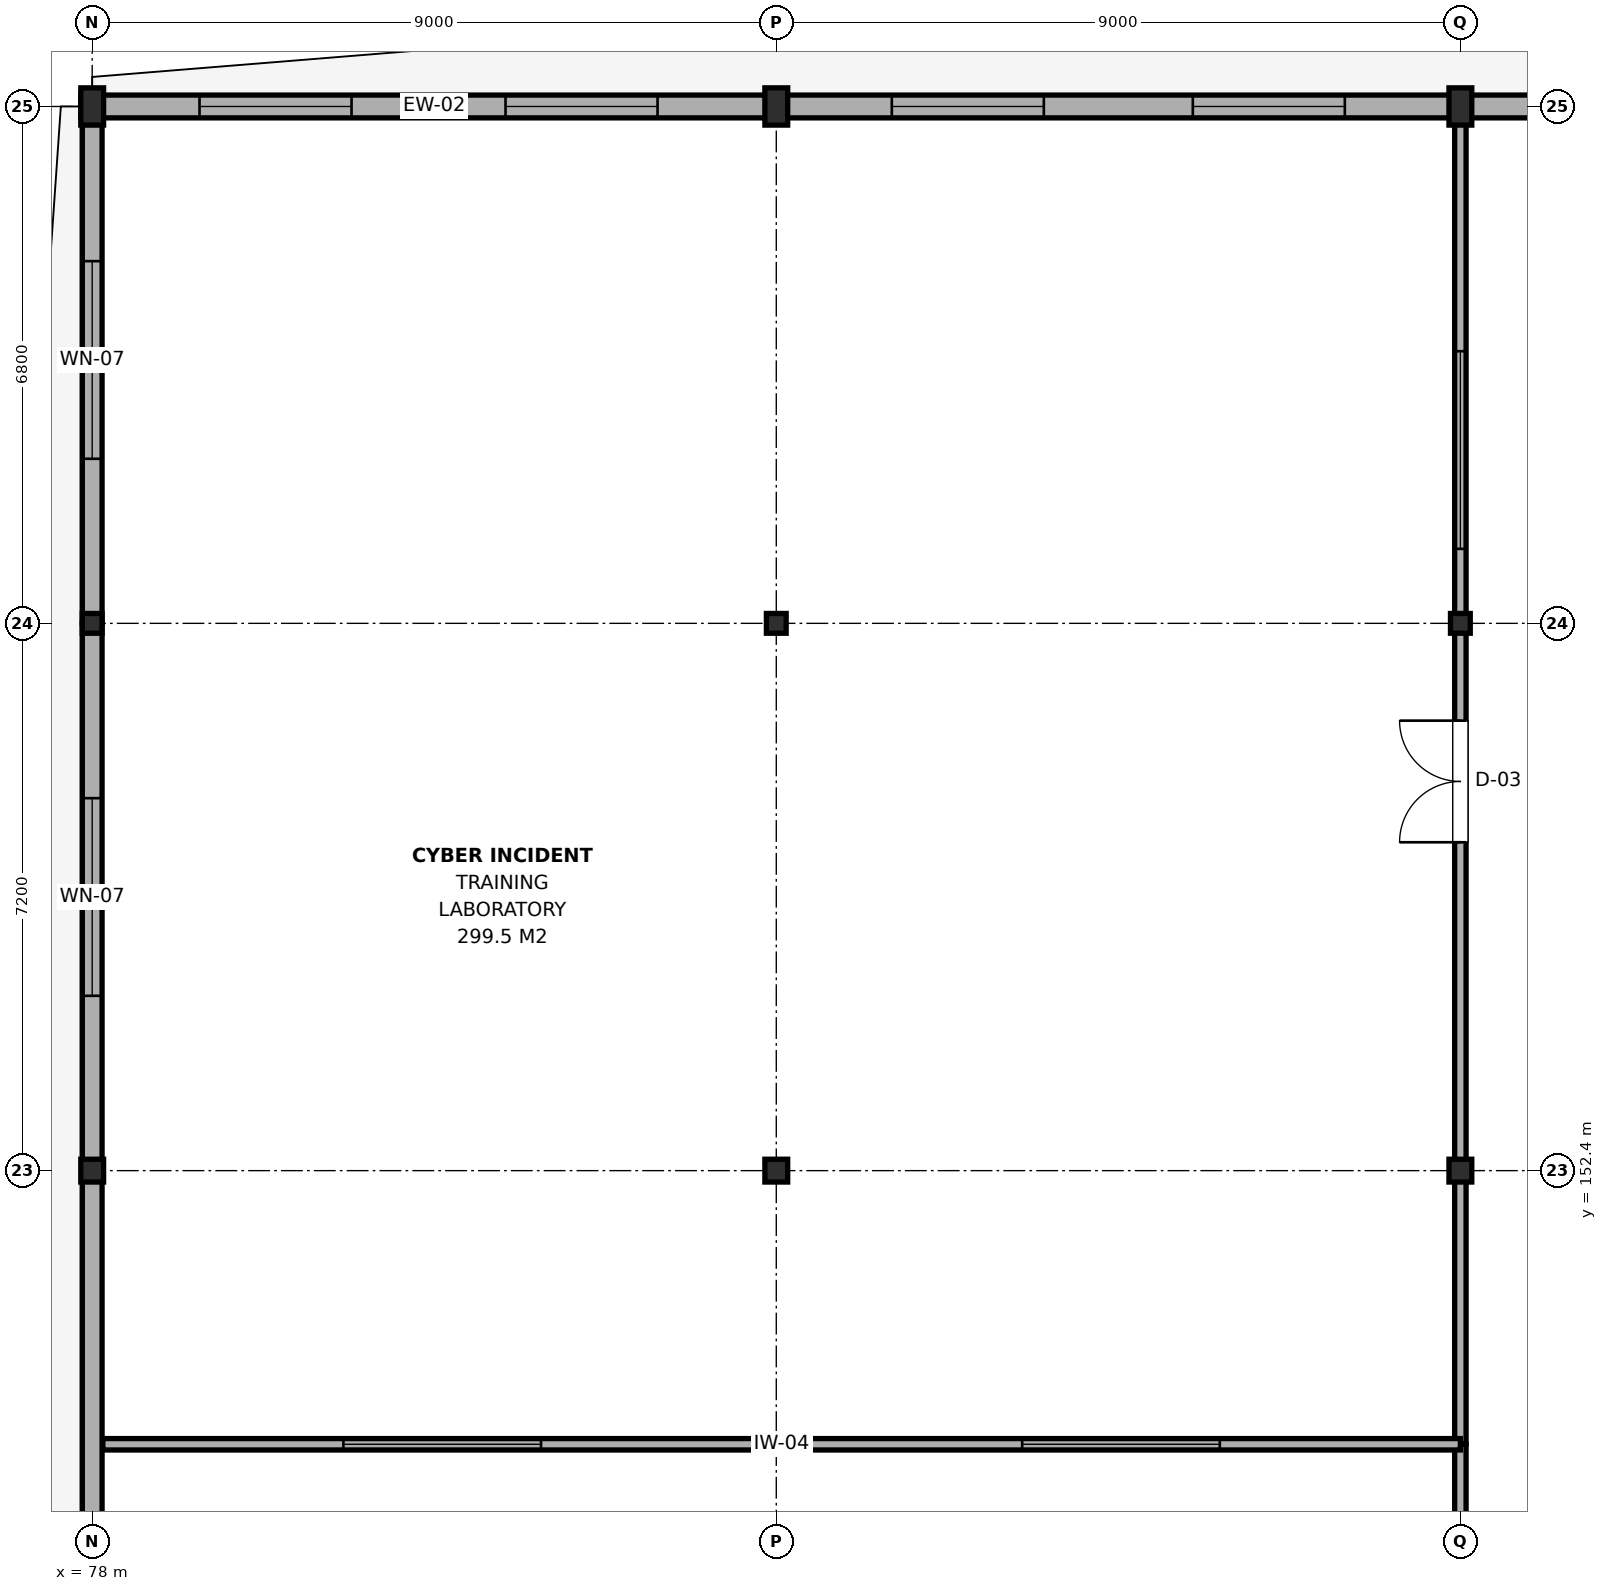
"""IFC4 building model, lengths in metres.
Left out: names, types, materials, properties, quantities, classifications, styles, units other than length and angle.
Written with IfcOpenShell. Run it as: python <this file> out.ifc"""

import sys

from ifc_helpers import new_model, si_unit, direction, frame, frame_2d, origin, origin_2d, place, context, subcontext, project, spatial, rectangle, i_section, extrude, element, fill, save


model = new_model("IFC4")
c1 = context("Model", 3, precision=1e-05, world=origin(), true_north=direction((0.0, 1.0)))
c2 = subcontext(c1, "Body", "Model", "MODEL_VIEW")
j1 = project(units=[si_unit("LENGTHUNIT", "METRE"), si_unit("PLANEANGLEUNIT", "RADIAN")], contexts=[c1])
p1 = place(None, origin())
s1 = spatial("IfcSite", under=j1, at=p1, CompositionType="ELEMENT")
p2 = place(p1, origin())
s2 = spatial("IfcBuilding", under=s1, at=p2, CompositionType="ELEMENT")
p3 = place(p2, frame((0.0, 0.0, 17.1)))
s3 = spatial("IfcBuildingStorey", under=s2, at=p3, CompositionType="ELEMENT", Elevation=17.1)
p4 = place(p3, frame((78.0, 152.4, 0.0), z_axis=(0.0, 0.0, 1.0), x_axis=(1.0, 0.0, 0.0)))
e1 = element("IfcColumn", 1, at=p4, inside=s3, PredefinedType="COLUMN", context=c2, shape_type="SweptSolid", body=[
    extrude(i_section(OverallWidth=0.3, OverallDepth=0.3, WebThickness=0.011, FlangeThickness=0.019, FilletRadius=0.027, at=origin_2d()), origin(), (0.0, 0.0, 1.0), 3.9),
])
p5 = place(p3, frame((78.0, 159.6, 0.0), z_axis=(0.0, 0.0, 1.0), x_axis=(1.0, 0.0, 0.0)))
e2 = element("IfcColumn", 2, at=p5, inside=s3, PredefinedType="COLUMN", context=c2, shape_type="SweptSolid", body=[
    extrude(i_section(OverallWidth=0.26, OverallDepth=0.26, WebThickness=0.01, FlangeThickness=0.018, FilletRadius=0.024, at=origin_2d()), origin(), (0.0, 0.0, 1.0), 3.9),
])
p6 = place(p3, frame((78.0, 166.4, 0.0), z_axis=(0.0, 0.0, 1.0), x_axis=(1.0, 0.0, 0.0)))
e3 = element("IfcColumn", 3, at=p6, inside=s3, PredefinedType="COLUMN", context=c2, shape_type="SweptSolid", body=[
    extrude(i_section(OverallWidth=0.3, OverallDepth=0.49, WebThickness=0.012, FlangeThickness=0.023, FilletRadius=0.027, at=origin_2d()), origin(), (0.0, 0.0, 1.0), 3.9),
])
p7 = place(p3, frame((87.0, 152.4, 0.0), z_axis=(0.0, 0.0, 1.0), x_axis=(1.0, 0.0, 0.0)))
e4 = element("IfcColumn", 4, at=p7, inside=s3, PredefinedType="COLUMN", context=c2, shape_type="SweptSolid", body=[
    extrude(i_section(OverallWidth=0.3, OverallDepth=0.3, WebThickness=0.011, FlangeThickness=0.019, FilletRadius=0.027, at=origin_2d()), origin(), (0.0, 0.0, 1.0), 3.9),
])
p8 = place(p3, frame((87.0, 159.6, 0.0), z_axis=(0.0, 0.0, 1.0), x_axis=(1.0, 0.0, 0.0)))
e5 = element("IfcColumn", 5, at=p8, inside=s3, PredefinedType="COLUMN", context=c2, shape_type="SweptSolid", body=[
    extrude(i_section(OverallWidth=0.26, OverallDepth=0.26, WebThickness=0.01, FlangeThickness=0.018, FilletRadius=0.024, at=origin_2d()), origin(), (0.0, 0.0, 1.0), 3.9),
])
p9 = place(p3, frame((87.0, 166.4, 0.0), z_axis=(0.0, 0.0, 1.0), x_axis=(1.0, 0.0, 0.0)))
e6 = element("IfcColumn", 6, at=p9, inside=s3, PredefinedType="COLUMN", context=c2, shape_type="SweptSolid", body=[
    extrude(i_section(OverallWidth=0.3, OverallDepth=0.49, WebThickness=0.012, FlangeThickness=0.023, FilletRadius=0.027, at=origin_2d()), origin(), (0.0, 0.0, 1.0), 3.9),
])
p10 = place(p3, frame((96.0, 152.4, 0.0), z_axis=(0.0, 0.0, 1.0), x_axis=(1.0, 0.0, 0.0)))
e7 = element("IfcColumn", 7, at=p10, inside=s3, PredefinedType="COLUMN", context=c2, shape_type="SweptSolid", body=[
    extrude(i_section(OverallWidth=0.3, OverallDepth=0.3, WebThickness=0.011, FlangeThickness=0.019, FilletRadius=0.027, at=origin_2d()), origin(), (0.0, 0.0, 1.0), 3.9),
])
p11 = place(p3, frame((96.0, 159.6, 0.0), z_axis=(0.0, 0.0, 1.0), x_axis=(1.0, 0.0, 0.0)))
e8 = element("IfcColumn", 8, at=p11, inside=s3, PredefinedType="COLUMN", context=c2, shape_type="SweptSolid", body=[
    extrude(i_section(OverallWidth=0.26, OverallDepth=0.26, WebThickness=0.01, FlangeThickness=0.018, FilletRadius=0.024, at=origin_2d()), origin(), (0.0, 0.0, 1.0), 3.9),
])
p12 = place(p3, frame((96.0, 166.4, 0.0), z_axis=(0.0, 0.0, 1.0), x_axis=(1.0, 0.0, 0.0)))
e9 = element("IfcColumn", 9, at=p12, inside=s3, PredefinedType="COLUMN", context=c2, shape_type="SweptSolid", body=[
    extrude(i_section(OverallWidth=0.3, OverallDepth=0.49, WebThickness=0.012, FlangeThickness=0.023, FilletRadius=0.027, at=origin_2d()), origin(), (0.0, 0.0, 1.0), 3.9),
])
p13 = place(p3, frame((78.0, 145.2, 0.0), z_axis=(0.0, 0.0, 1.0), x_axis=(0.0, 1.0, 0.0)))
e10 = element("IfcWall", 10, at=p13, inside=s3, PredefinedType="SOLIDWALL", context=c2, shape_type="SweptSolid", body=[
    extrude(rectangle(XDim=7.2, YDim=0.26, at=frame_2d((3.6, 0.0))), origin(), (0.0, 0.0, 1.0), 3.095),
])
p14 = place(p3, frame((78.0, 152.4, 0.0), z_axis=(0.0, 0.0, 1.0), x_axis=(0.0, 1.0, 0.0)))
e11 = element("IfcWall", 11, at=p14, inside=s3, PredefinedType="SOLIDWALL", context=c2, shape_type="SweptSolid", body=[
    extrude(rectangle(XDim=7.2, YDim=0.26, at=frame_2d((3.6, 0.0))), origin(), (0.0, 0.0, 1.0), 3.095),
])
p15 = place(p14, frame((2.3, 0.0, 1.05)))
e12 = element("IfcOpeningElement", 12, at=p15, cuts=e11, PredefinedType="OPENING", context=c2, shape_type="SweptSolid", body=[
    extrude(rectangle(XDim=2.6, YDim=1.5, at=frame_2d((1.3, 0.75))), frame((0.0, 0.145, 0.0), z_axis=(0.0, -1.0, 0.0), x_axis=(1.0, 0.0, 0.0)), (0.0, 0.0, 1.0), 0.29),
])
p16 = place(p3, frame((78.0, 159.6, 0.0), z_axis=(0.0, 0.0, 1.0), x_axis=(0.0, 1.0, 0.0)))
e13 = element("IfcWall", 13, at=p16, inside=s3, PredefinedType="SOLIDWALL", context=c2, shape_type="SweptSolid", body=[
    extrude(rectangle(XDim=6.93, YDim=0.26, at=frame_2d((3.465, 0.0))), origin(), (0.0, 0.0, 1.0), 3.145),
])
p17 = place(p16, frame((2.165, 0.0, 1.05)))
e14 = element("IfcOpeningElement", 14, at=p17, cuts=e13, PredefinedType="OPENING", context=c2, shape_type="SweptSolid", body=[
    extrude(rectangle(XDim=2.6, YDim=1.5, at=frame_2d((1.3, 0.75))), frame((0.0, 0.145, 0.0), z_axis=(0.0, -1.0, 0.0), x_axis=(1.0, 0.0, 0.0)), (0.0, 0.0, 1.0), 0.29),
])
p18 = place(p3, frame((77.85, 166.4, 0.0), z_axis=(0.0, 0.0, 1.0), x_axis=(1.0, 0.0, 0.0)))
e15 = element("IfcWall", 15, at=p18, inside=s3, PredefinedType="SOLIDWALL", context=c2, shape_type="SweptSolid", body=[
    extrude(rectangle(XDim=9.15, YDim=0.3, at=frame_2d((4.575, 0.0))), origin(), (0.0, 0.0, 1.0), 3.255),
])
p19 = place(p18, frame((1.562, 0.0, 0.65)))
e16 = element("IfcOpeningElement", 16, at=p19, cuts=e15, PredefinedType="OPENING", context=c2, shape_type="SweptSolid", body=[
    extrude(rectangle(XDim=2.0, YDim=1.8, at=frame_2d((1.0, 0.9))), frame((0.0, 0.165, 0.0), z_axis=(0.0, -1.0, 0.0), x_axis=(1.0, 0.0, 0.0)), (0.0, 0.0, 1.0), 0.33),
])
p20 = place(p18, frame((5.588, 0.0, 0.65)))
e17 = element("IfcOpeningElement", 17, at=p20, cuts=e15, PredefinedType="OPENING", context=c2, shape_type="SweptSolid", body=[
    extrude(rectangle(XDim=2.0, YDim=1.8, at=frame_2d((1.0, 0.9))), frame((0.0, 0.165, 0.0), z_axis=(0.0, -1.0, 0.0), x_axis=(1.0, 0.0, 0.0)), (0.0, 0.0, 1.0), 0.33),
])
p21 = place(p3, frame((87.0, 166.4, 0.0), z_axis=(0.0, 0.0, 1.0), x_axis=(1.0, 0.0, 0.0)))
e18 = element("IfcWall", 18, at=p21, inside=s3, PredefinedType="SOLIDWALL", context=c2, shape_type="SweptSolid", body=[
    extrude(rectangle(XDim=9.0, YDim=0.3, at=frame_2d((4.5, 0.0))), origin(), (0.0, 0.0, 1.0), 3.255),
])
p22 = place(p21, frame((1.52, 0.0, 0.65)))
e19 = element("IfcOpeningElement", 19, at=p22, cuts=e18, PredefinedType="OPENING", context=c2, shape_type="SweptSolid", body=[
    extrude(rectangle(XDim=2.0, YDim=1.8, at=frame_2d((1.0, 0.9))), frame((0.0, 0.165, 0.0), z_axis=(0.0, -1.0, 0.0), x_axis=(1.0, 0.0, 0.0)), (0.0, 0.0, 1.0), 0.33),
])
p23 = place(p21, frame((5.48, 0.0, 0.65)))
e20 = element("IfcOpeningElement", 20, at=p23, cuts=e18, PredefinedType="OPENING", context=c2, shape_type="SweptSolid", body=[
    extrude(rectangle(XDim=2.0, YDim=1.8, at=frame_2d((1.0, 0.9))), frame((0.0, 0.165, 0.0), z_axis=(0.0, -1.0, 0.0), x_axis=(1.0, 0.0, 0.0)), (0.0, 0.0, 1.0), 0.33),
])
p24 = place(p3, frame((96.0, 166.4, 0.0), z_axis=(0.0, 0.0, 1.0), x_axis=(1.0, 0.0, 0.0)))
e21 = element("IfcWall", 21, at=p24, inside=s3, PredefinedType="SOLIDWALL", context=c2, shape_type="SweptSolid", body=[
    extrude(rectangle(XDim=9.0, YDim=0.3, at=frame_2d((4.5, 0.0))), origin(), (0.0, 0.0, 1.0), 3.105),
])
p25 = place(p3, frame((96.0, 122.56, 0.0), z_axis=(0.0, 0.0, 1.0), x_axis=(0.0, 1.0, 0.0)))
e22 = element("IfcWall", 22, at=p25, inside=s3, PredefinedType="PARTITIONING", context=c2, shape_type="SweptSolid", body=[
    extrude(rectangle(XDim=26.24, YDim=0.15, at=frame_2d((13.12, 0.0))), origin(), (0.0, 0.0, 1.0), 3.095),
])
p26 = place(p25, frame((12.32, 0.0, 0.0)))
e23 = element("IfcOpeningElement", 23, at=p26, cuts=e22, PredefinedType="OPENING", context=c2, shape_type="SweptSolid", body=[
    extrude(rectangle(XDim=1.6, YDim=2.15, at=frame_2d((0.8, 1.075))), frame((0.0, 0.09, 0.0), z_axis=(0.0, -1.0, 0.0), x_axis=(1.0, 0.0, 0.0)), (0.0, 0.0, 1.0), 0.18),
])
p27 = place(p25, frame((18.38, 0.0, 0.95)))
e24 = element("IfcOpeningElement", 24, at=p27, cuts=e22, PredefinedType="OPENING", context=c2, shape_type="SweptSolid", body=[
    extrude(rectangle(XDim=2.6, YDim=1.5, at=frame_2d((1.3, 0.75))), frame((0.0, 0.09, 0.0), z_axis=(0.0, -1.0, 0.0), x_axis=(1.0, 0.0, 0.0)), (0.0, 0.0, 1.0), 0.18),
])
p28 = place(p3, frame((96.0, 148.8, 0.0), z_axis=(0.0, 0.0, 1.0), x_axis=(0.0, 1.0, 0.0)))
e25 = element("IfcWall", 25, at=p28, inside=s3, PredefinedType="PARTITIONING", context=c2, shape_type="SweptSolid", body=[
    extrude(rectangle(XDim=17.44, YDim=0.15, at=frame_2d((8.72, 0.0))), origin(), (0.0, 0.0, 1.0), 3.095),
])
p29 = place(p28, frame((7.92, 0.0, 0.0)))
e26 = element("IfcOpeningElement", 26, at=p29, cuts=e25, PredefinedType="OPENING", context=c2, shape_type="SweptSolid", body=[
    extrude(rectangle(XDim=1.6, YDim=2.15, at=frame_2d((0.8, 1.075))), frame((0.0, 0.09, 0.0), z_axis=(0.0, -1.0, 0.0), x_axis=(1.0, 0.0, 0.0)), (0.0, 0.0, 1.0), 0.18),
])
p30 = place(p28, frame((11.78, 0.0, 0.95)))
e27 = element("IfcOpeningElement", 27, at=p30, cuts=e25, PredefinedType="OPENING", context=c2, shape_type="SweptSolid", body=[
    extrude(rectangle(XDim=2.6, YDim=1.5, at=frame_2d((1.3, 0.75))), frame((0.0, 0.09, 0.0), z_axis=(0.0, -1.0, 0.0), x_axis=(1.0, 0.0, 0.0)), (0.0, 0.0, 1.0), 0.18),
])
p31 = place(p3, frame((78.14, 148.8, 0.0), z_axis=(0.0, 0.0, 1.0), x_axis=(1.0, 0.0, 0.0)))
e28 = element("IfcWall", 28, at=p31, inside=s3, PredefinedType="PARTITIONING", context=c2, shape_type="SweptSolid", body=[
    extrude(rectangle(XDim=17.86, YDim=0.15, at=frame_2d((8.93, 0.0))), origin(), (0.0, 0.0, 1.0), 3.095),
])
p32 = place(p31, frame((3.165, 0.0, 0.95)))
e29 = element("IfcOpeningElement", 29, at=p32, cuts=e28, PredefinedType="OPENING", context=c2, shape_type="SweptSolid", body=[
    extrude(rectangle(XDim=2.6, YDim=1.5, at=frame_2d((1.3, 0.75))), frame((0.0, 0.09, 0.0), z_axis=(0.0, -1.0, 0.0), x_axis=(1.0, 0.0, 0.0)), (0.0, 0.0, 1.0), 0.18),
])
p33 = place(p31, frame((12.095, 0.0, 0.95)))
e30 = element("IfcOpeningElement", 30, at=p33, cuts=e28, PredefinedType="OPENING", context=c2, shape_type="SweptSolid", body=[
    extrude(rectangle(XDim=2.6, YDim=1.5, at=frame_2d((1.3, 0.75))), frame((0.0, 0.09, 0.0), z_axis=(0.0, -1.0, 0.0), x_axis=(1.0, 0.0, 0.0)), (0.0, 0.0, 1.0), 0.18),
])
p34 = place(p15, origin())
e31 = element("IfcWindow", 31, at=p34, inside=s3, PartitioningType="SINGLE_PANEL", PredefinedType="WINDOW", context=c2, shape_type="SweptSolid", body=[
    extrude(rectangle(XDim=2.6, YDim=1.5, at=frame_2d((1.3, 0.75))), frame((0.0, 0.03, 0.0), z_axis=(0.0, -1.0, 0.0), x_axis=(1.0, 0.0, 0.0)), (0.0, 0.0, 1.0), 0.06),
])
fill(e12, e31)
p35 = place(p17, origin())
e32 = element("IfcWindow", 32, at=p35, inside=s3, PartitioningType="SINGLE_PANEL", PredefinedType="WINDOW", context=c2, shape_type="SweptSolid", body=[
    extrude(rectangle(XDim=2.6, YDim=1.5, at=frame_2d((1.3, 0.75))), frame((0.0, 0.03, 0.0), z_axis=(0.0, -1.0, 0.0), x_axis=(1.0, 0.0, 0.0)), (0.0, 0.0, 1.0), 0.06),
])
fill(e14, e32)
p36 = place(p19, origin())
e33 = element("IfcWindow", 33, at=p36, inside=s3, PartitioningType="SINGLE_PANEL", PredefinedType="WINDOW", context=c2, shape_type="SweptSolid", body=[
    extrude(rectangle(XDim=2.0, YDim=1.8, at=frame_2d((1.0, 0.9))), frame((0.0, 0.03, 0.0), z_axis=(0.0, -1.0, 0.0), x_axis=(1.0, 0.0, 0.0)), (0.0, 0.0, 1.0), 0.06),
])
fill(e16, e33)
p37 = place(p20, origin())
e34 = element("IfcWindow", 34, at=p37, inside=s3, PartitioningType="SINGLE_PANEL", PredefinedType="WINDOW", context=c2, shape_type="SweptSolid", body=[
    extrude(rectangle(XDim=2.0, YDim=1.8, at=frame_2d((1.0, 0.9))), frame((0.0, 0.03, 0.0), z_axis=(0.0, -1.0, 0.0), x_axis=(1.0, 0.0, 0.0)), (0.0, 0.0, 1.0), 0.06),
])
fill(e17, e34)
p38 = place(p22, origin())
e35 = element("IfcWindow", 35, at=p38, inside=s3, PartitioningType="SINGLE_PANEL", PredefinedType="WINDOW", context=c2, shape_type="SweptSolid", body=[
    extrude(rectangle(XDim=2.0, YDim=1.8, at=frame_2d((1.0, 0.9))), frame((0.0, 0.03, 0.0), z_axis=(0.0, -1.0, 0.0), x_axis=(1.0, 0.0, 0.0)), (0.0, 0.0, 1.0), 0.06),
])
fill(e19, e35)
p39 = place(p23, origin())
e36 = element("IfcWindow", 36, at=p39, inside=s3, PartitioningType="SINGLE_PANEL", PredefinedType="WINDOW", context=c2, shape_type="SweptSolid", body=[
    extrude(rectangle(XDim=2.0, YDim=1.8, at=frame_2d((1.0, 0.9))), frame((0.0, 0.03, 0.0), z_axis=(0.0, -1.0, 0.0), x_axis=(1.0, 0.0, 0.0)), (0.0, 0.0, 1.0), 0.06),
])
fill(e20, e36)
p40 = place(p29, origin())
e37 = element("IfcDoor", 37, at=p40, inside=s3, OperationType="DOUBLE_DOOR_SINGLE_SWING", PredefinedType="DOOR", context=c2, shape_type="SweptSolid", body=[
    extrude(rectangle(XDim=1.6, YDim=2.15, at=frame_2d((0.8, 1.075))), frame((0.0, 0.025, 0.0), z_axis=(0.0, -1.0, 0.0), x_axis=(1.0, 0.0, 0.0)), (0.0, 0.0, 1.0), 0.05),
])
fill(e26, e37)
p41 = place(p30, origin())
e38 = element("IfcWindow", 38, at=p41, inside=s3, PartitioningType="SINGLE_PANEL", PredefinedType="WINDOW", context=c2, shape_type="SweptSolid", body=[
    extrude(rectangle(XDim=2.6, YDim=1.5, at=frame_2d((1.3, 0.75))), frame((0.0, 0.03, 0.0), z_axis=(0.0, -1.0, 0.0), x_axis=(1.0, 0.0, 0.0)), (0.0, 0.0, 1.0), 0.06),
])
fill(e27, e38)
p42 = place(p32, origin())
e39 = element("IfcWindow", 39, at=p42, inside=s3, PartitioningType="SINGLE_PANEL", PredefinedType="WINDOW", context=c2, shape_type="SweptSolid", body=[
    extrude(rectangle(XDim=2.6, YDim=1.5, at=frame_2d((1.3, 0.75))), frame((0.0, 0.03, 0.0), z_axis=(0.0, -1.0, 0.0), x_axis=(1.0, 0.0, 0.0)), (0.0, 0.0, 1.0), 0.06),
])
fill(e29, e39)
p43 = place(p33, origin())
e40 = element("IfcWindow", 40, at=p43, inside=s3, PartitioningType="SINGLE_PANEL", PredefinedType="WINDOW", context=c2, shape_type="SweptSolid", body=[
    extrude(rectangle(XDim=2.6, YDim=1.5, at=frame_2d((1.3, 0.75))), frame((0.0, 0.03, 0.0), z_axis=(0.0, -1.0, 0.0), x_axis=(1.0, 0.0, 0.0)), (0.0, 0.0, 1.0), 0.06),
])
fill(e30, e40)
save(model, sys.argv[1])
